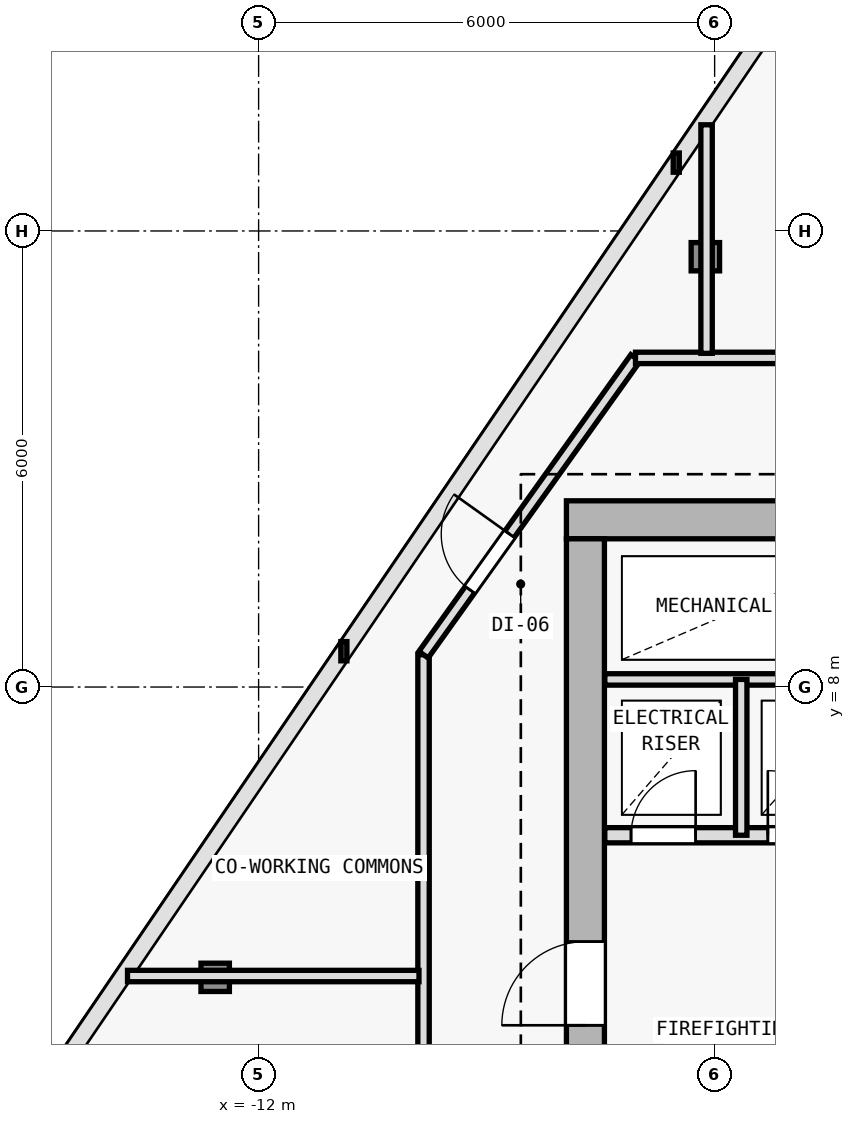
"""IFC4 building model, lengths in metres.
Left out: names, types, materials, properties, quantities, classifications, styles, units other than length and angle.
Written with IfcOpenShell. Run it as: python <this file> out.ifc"""

import sys

from ifc_helpers import new_model, si_unit, direction, frame, frame_2d, origin, origin_2d, place, context, subcontext, project, spatial, rectangle, i_section, extrude, element, fill, save


model = new_model("IFC4")
c1 = context("Model", 3, precision=1e-05, world=origin(), true_north=direction((0.0, 1.0)))
c2 = subcontext(c1, "Body", "Model", "MODEL_VIEW")
j1 = project(units=[si_unit("LENGTHUNIT", "METRE"), si_unit("PLANEANGLEUNIT", "RADIAN")], contexts=[c1])
p1 = place(None, origin())
s1 = spatial("IfcSite", under=j1, at=p1, CompositionType="ELEMENT")
p2 = place(p1, origin())
s2 = spatial("IfcBuilding", under=s1, at=p2, CompositionType="ELEMENT")
p3 = place(p2, frame((0.0, 0.0, 246.3)))
s3 = spatial("IfcBuildingStorey", under=s2, at=p3, CompositionType="ELEMENT", Elevation=246.3)
p4 = place(p3, frame((-7.7, 10.2, 0.0), z_axis=(0.0, 0.0, 1.0), x_axis=(1.0, 0.0, 0.0)))
e1 = element("IfcColumn", 1, at=p4, inside=s3, PredefinedType="COLUMN", context=c2, shape_type="SweptSolid", body=[
    extrude(i_section(OverallWidth=0.398, OverallDepth=0.387, WebThickness=0.013, FlangeThickness=0.022, FilletRadius=0.015, at=origin_2d()), origin(), (0.0, 0.0, 1.0), 4.5),
])
p5 = place(p3, frame((-6.122, 13.661, 0.005), z_axis=(0.007070021631, -0.002012236926, 0.999972982483), x_axis=(0.273743828055, 0.961802639112, 0.0)))
e2 = element("IfcColumn", 2, at=p5, inside=s3, PredefinedType="COLUMN", context=c2, shape_type="SweptSolid", body=[
    extrude(i_section(OverallWidth=0.374, OverallDepth=0.372, WebThickness=0.012, FlangeThickness=0.02, FilletRadius=0.015, at=origin_2d()), origin(), (0.0, 0.0, 1.0), 4.489),
])
p6 = place(p3, frame((-12.571, 4.181, 0.005), z_axis=(0.01359491219, 0.007613150827, 0.99987860178), x_axis=(-0.488603368932, 0.87250601595, 0.0)))
e3 = element("IfcColumn", 3, at=p6, inside=s3, PredefinedType="COLUMN", context=c2, shape_type="SweptSolid", body=[
    extrude(i_section(OverallWidth=0.374, OverallDepth=0.372, WebThickness=0.012, FlangeThickness=0.02, FilletRadius=0.015, at=origin_2d()), origin(), (0.0, 0.0, 1.0), 4.49),
])
p7 = place(p3, frame((7.95, 10.2, 0.0), z_axis=(0.0, 0.0, 1.0), x_axis=(-1.0, 0.0, 0.0)))
e4 = element("IfcWall", 4, at=p7, inside=s3, PredefinedType="SHEAR", context=c2, shape_type="SweptSolid", body=[
    extrude(rectangle(XDim=15.9, YDim=0.5, at=frame_2d((7.95, 0.0))), origin(), (0.0, 0.0, 1.0), 4.25),
])
p8 = place(p7, frame((4.4, 0.0, 0.0)))
e5 = element("IfcOpeningElement", 5, at=p8, cuts=e4, PredefinedType="OPENING", context=c2, shape_type="SweptSolid", body=[
    extrude(rectangle(XDim=1.1, YDim=2.15, at=frame_2d((0.55, 1.075))), frame((0.0, 0.26, 0.0), z_axis=(0.0, -1.0, 0.0), x_axis=(1.0, 0.0, 0.0)), (0.0, 0.0, 1.0), 0.52),
])
p9 = place(p3, frame((-7.7, -9.15, 0.0), z_axis=(0.0, 0.0, 1.0), x_axis=(0.0, 1.0, 0.0)))
e6 = element("IfcWall", 6, at=p9, inside=s3, PredefinedType="SHEAR", context=c2, shape_type="SweptSolid", body=[
    extrude(rectangle(XDim=19.1, YDim=0.5, at=frame_2d((9.55, 0.0))), origin(), (0.0, 0.0, 1.0), 4.25),
])
p10 = place(p9, frame((12.7, 0.0, 0.0)))
e7 = element("IfcOpeningElement", 7, at=p10, cuts=e6, PredefinedType="OPENING", context=c2, shape_type="SweptSolid", body=[
    extrude(rectangle(XDim=1.1, YDim=2.15, at=frame_2d((0.55, 1.075))), frame((0.0, 0.26, 0.0), z_axis=(0.0, -1.0, 0.0), x_axis=(1.0, 0.0, 0.0)), (0.0, 0.0, 1.0), 0.52),
])
p11 = place(p3, frame((-7.445, 6.05, 0.0), z_axis=(0.0, 0.0, 1.0), x_axis=(1.0, 0.0, 0.0)))
e8 = element("IfcWall", 8, at=p11, inside=s3, PredefinedType="SOLIDWALL", context=c2, shape_type="SweptSolid", body=[
    extrude(rectangle(XDim=3.595, YDim=0.2, at=frame_2d((1.797, 0.0))), origin(), (0.0, 0.0, 1.0), 4.25),
])
p12 = place(p11, frame((0.345, 0.0, 0.0)))
e9 = element("IfcOpeningElement", 9, at=p12, cuts=e8, PredefinedType="OPENING", context=c2, shape_type="SweptSolid", body=[
    extrude(rectangle(XDim=0.85, YDim=2.1, at=frame_2d((0.425, 1.05))), frame((0.0, 0.11, 0.0), z_axis=(0.0, -1.0, 0.0), x_axis=(1.0, 0.0, 0.0)), (0.0, 0.0, 1.0), 0.22),
])
p13 = place(p11, frame((2.145, 0.0, 0.0)))
e10 = element("IfcOpeningElement", 10, at=p13, cuts=e8, PredefinedType="OPENING", context=c2, shape_type="SweptSolid", body=[
    extrude(rectangle(XDim=0.85, YDim=2.1, at=frame_2d((0.425, 1.05))), frame((0.0, 0.11, 0.0), z_axis=(0.0, -1.0, 0.0), x_axis=(1.0, 0.0, 0.0)), (0.0, 0.0, 1.0), 0.22),
])
p14 = place(p3, frame((-7.445, 8.1, 0.0), z_axis=(0.0, 0.0, 1.0), x_axis=(1.0, 0.0, 0.0)))
e11 = element("IfcWall", 11, at=p14, inside=s3, PredefinedType="PARTITIONING", context=c2, shape_type="SweptSolid", body=[
    extrude(rectangle(XDim=3.595, YDim=0.15, at=frame_2d((1.797, 0.0))), origin(), (0.0, 0.0, 1.0), 4.25),
])
p15 = place(p3, frame((-5.65, 6.05, 0.0), z_axis=(0.0, 0.0, 1.0), x_axis=(0.0, 1.0, 0.0)))
e12 = element("IfcWall", 12, at=p15, inside=s3, PredefinedType="PARTITIONING", context=c2, shape_type="SweptSolid", body=[
    extrude(rectangle(XDim=2.05, YDim=0.15, at=frame_2d((1.025, 0.0))), origin(), (0.0, 0.0, 1.0), 4.25),
])
p16 = place(p3, frame((-9.83, -11.53, 0.0), z_axis=(0.0, 0.0, 1.0), x_axis=(0.0, 1.0, 0.0)))
e13 = element("IfcWall", 13, at=p16, inside=s3, PredefinedType="PARTITIONING", context=c2, shape_type="SweptSolid", body=[
    extrude(rectangle(XDim=19.956, YDim=0.15, at=frame_2d((9.978, 0.0))), origin(), (0.0, 0.0, 1.0), 3.725),
])
p17 = place(p16, frame((8.034, 0.0, 0.0)))
e14 = element("IfcOpeningElement", 14, at=p17, cuts=e13, PredefinedType="OPENING", context=c2, shape_type="SweptSolid", body=[
    extrude(rectangle(XDim=0.9, YDim=2.1, at=frame_2d((0.45, 1.05))), frame((0.0, 0.085, 0.0), z_axis=(0.0, -1.0, 0.0), x_axis=(1.0, 0.0, 0.0)), (0.0, 0.0, 1.0), 0.17),
])
p18 = place(p16, frame((4.513, 0.0, 0.0)))
e15 = element("IfcOpeningElement", 15, at=p18, cuts=e13, PredefinedType="OPENING", context=c2, shape_type="SweptSolid", body=[
    extrude(rectangle(XDim=0.9, YDim=2.1, at=frame_2d((0.45, 1.05))), frame((0.0, 0.085, 0.0), z_axis=(0.0, -1.0, 0.0), x_axis=(1.0, 0.0, 0.0)), (0.0, 0.0, 1.0), 0.17),
])
p19 = place(p16, frame((1.468, 0.0, 0.0)))
e16 = element("IfcOpeningElement", 16, at=p19, cuts=e13, PredefinedType="OPENING", context=c2, shape_type="SweptSolid", body=[
    extrude(rectangle(XDim=0.9, YDim=2.1, at=frame_2d((0.45, 1.05))), frame((0.0, 0.085, 0.0), z_axis=(0.0, -1.0, 0.0), x_axis=(1.0, 0.0, 0.0)), (0.0, 0.0, 1.0), 0.17),
])
p20 = place(p16, frame((12.763, 0.0, 0.0)))
e17 = element("IfcOpeningElement", 17, at=p20, cuts=e13, PredefinedType="OPENING", context=c2, shape_type="SweptSolid", body=[
    extrude(rectangle(XDim=0.9, YDim=2.1, at=frame_2d((0.45, 1.05))), frame((0.0, 0.085, 0.0), z_axis=(0.0, -1.0, 0.0), x_axis=(1.0, 0.0, 0.0)), (0.0, 0.0, 1.0), 0.17),
])
p21 = place(p3, frame((-9.83, 8.426, 0.0), z_axis=(0.0, 0.0, 1.0), x_axis=(0.581218941111, 0.813747222725, 0.0)))
e18 = element("IfcWall", 18, at=p21, inside=s3, PredefinedType="PARTITIONING", context=c2, shape_type="SweptSolid", body=[
    extrude(rectangle(XDim=4.798, YDim=0.15, at=frame_2d((2.399, 0.0))), origin(), (0.0, 0.0, 1.0), 3.875),
])
p22 = place(p21, frame((1.049, 0.0, 0.0)))
e19 = element("IfcOpeningElement", 19, at=p22, cuts=e18, PredefinedType="OPENING", context=c2, shape_type="SweptSolid", body=[
    extrude(rectangle(XDim=0.9, YDim=2.1, at=frame_2d((0.45, 1.05))), frame((0.0, 0.085, 0.0), z_axis=(0.0, -1.0, 0.0), x_axis=(1.0, 0.0, 0.0)), (0.0, 0.0, 1.0), 0.17),
])
p23 = place(p3, frame((-7.041, 12.33, 0.0), z_axis=(0.0, 0.0, 1.0), x_axis=(1.0, 0.0, 0.0)))
e20 = element("IfcWall", 20, at=p23, inside=s3, PredefinedType="PARTITIONING", context=c2, shape_type="SweptSolid", body=[
    extrude(rectangle(XDim=14.083, YDim=0.15, at=frame_2d((7.041, 0.0))), origin(), (0.0, 0.0, 1.0), 3.875),
])
p24 = place(p23, frame((10.956, 0.0, 0.0)))
e21 = element("IfcOpeningElement", 21, at=p24, cuts=e20, PredefinedType="OPENING", context=c2, shape_type="SweptSolid", body=[
    extrude(rectangle(XDim=0.9, YDim=2.1, at=frame_2d((0.45, 1.05))), frame((0.0, 0.085, 0.0), z_axis=(0.0, -1.0, 0.0), x_axis=(1.0, 0.0, 0.0)), (0.0, 0.0, 1.0), 0.17),
])
p25 = place(p23, frame((4.471, 0.0, 0.0)))
e22 = element("IfcOpeningElement", 22, at=p25, cuts=e20, PredefinedType="OPENING", context=c2, shape_type="SweptSolid", body=[
    extrude(rectangle(XDim=0.9, YDim=2.1, at=frame_2d((0.45, 1.05))), frame((0.0, 0.085, 0.0), z_axis=(0.0, -1.0, 0.0), x_axis=(1.0, 0.0, 0.0)), (0.0, 0.0, 1.0), 0.17),
])
p26 = place(p3, frame((-6.106, 12.39, 0.0), z_axis=(0.0, 0.0, 1.0), x_axis=(0.0, 1.0, 0.0)))
e23 = element("IfcWall", 23, at=p26, inside=s3, PredefinedType="PARTITIONING", context=c2, shape_type="SweptSolid", body=[
    extrude(rectangle(XDim=3.007, YDim=0.15, at=frame_2d((1.503, 0.0))), origin(), (0.0, 0.0, 1.0), 3.875),
])
p27 = place(p3, frame((-9.89, 4.198, 0.0), z_axis=(0.0, 0.0, 1.0), x_axis=(-1.0, 0.0, 0.0)))
e24 = element("IfcWall", 24, at=p27, inside=s3, PredefinedType="PARTITIONING", context=c2, shape_type="SweptSolid", body=[
    extrude(rectangle(XDim=3.835, YDim=0.15, at=frame_2d((1.917, 0.0))), origin(), (0.0, 0.0, 1.0), 3.725),
])
p28 = place(p10, origin())
e25 = element("IfcDoor", 25, at=p28, inside=s3, OperationType="SINGLE_SWING_LEFT", PredefinedType="DOOR", context=c2, shape_type="SweptSolid", body=[
    extrude(rectangle(XDim=1.1, YDim=2.15, at=frame_2d((0.55, 1.075))), frame((0.0, 0.025, 0.0), z_axis=(0.0, -1.0, 0.0), x_axis=(1.0, 0.0, 0.0)), (0.0, 0.0, 1.0), 0.05),
])
fill(e7, e25)
p29 = place(p12, origin())
e26 = element("IfcDoor", 26, at=p29, inside=s3, OperationType="SINGLE_SWING_RIGHT", PredefinedType="DOOR", context=c2, shape_type="SweptSolid", body=[
    extrude(rectangle(XDim=0.85, YDim=2.1, at=frame_2d((0.425, 1.05))), frame((0.0, 0.025, 0.0), z_axis=(0.0, -1.0, 0.0), x_axis=(1.0, 0.0, 0.0)), (0.0, 0.0, 1.0), 0.05),
])
fill(e9, e26)
p30 = place(p13, origin())
e27 = element("IfcDoor", 27, at=p30, inside=s3, OperationType="SINGLE_SWING_LEFT", PredefinedType="DOOR", context=c2, shape_type="SweptSolid", body=[
    extrude(rectangle(XDim=0.85, YDim=2.1, at=frame_2d((0.425, 1.05))), frame((0.0, 0.025, 0.0), z_axis=(0.0, -1.0, 0.0), x_axis=(1.0, 0.0, 0.0)), (0.0, 0.0, 1.0), 0.05),
])
fill(e10, e27)
p31 = place(p22, origin())
e28 = element("IfcDoor", 28, at=p31, inside=s3, OperationType="SINGLE_SWING_RIGHT", PredefinedType="DOOR", context=c2, shape_type="SweptSolid", body=[
    extrude(rectangle(XDim=0.9, YDim=2.1, at=frame_2d((0.45, 1.05))), frame((0.0, 0.025, 0.0), z_axis=(0.0, -1.0, 0.0), x_axis=(1.0, 0.0, 0.0)), (0.0, 0.0, 1.0), 0.05),
])
fill(e19, e28)
save(model, sys.argv[1])
